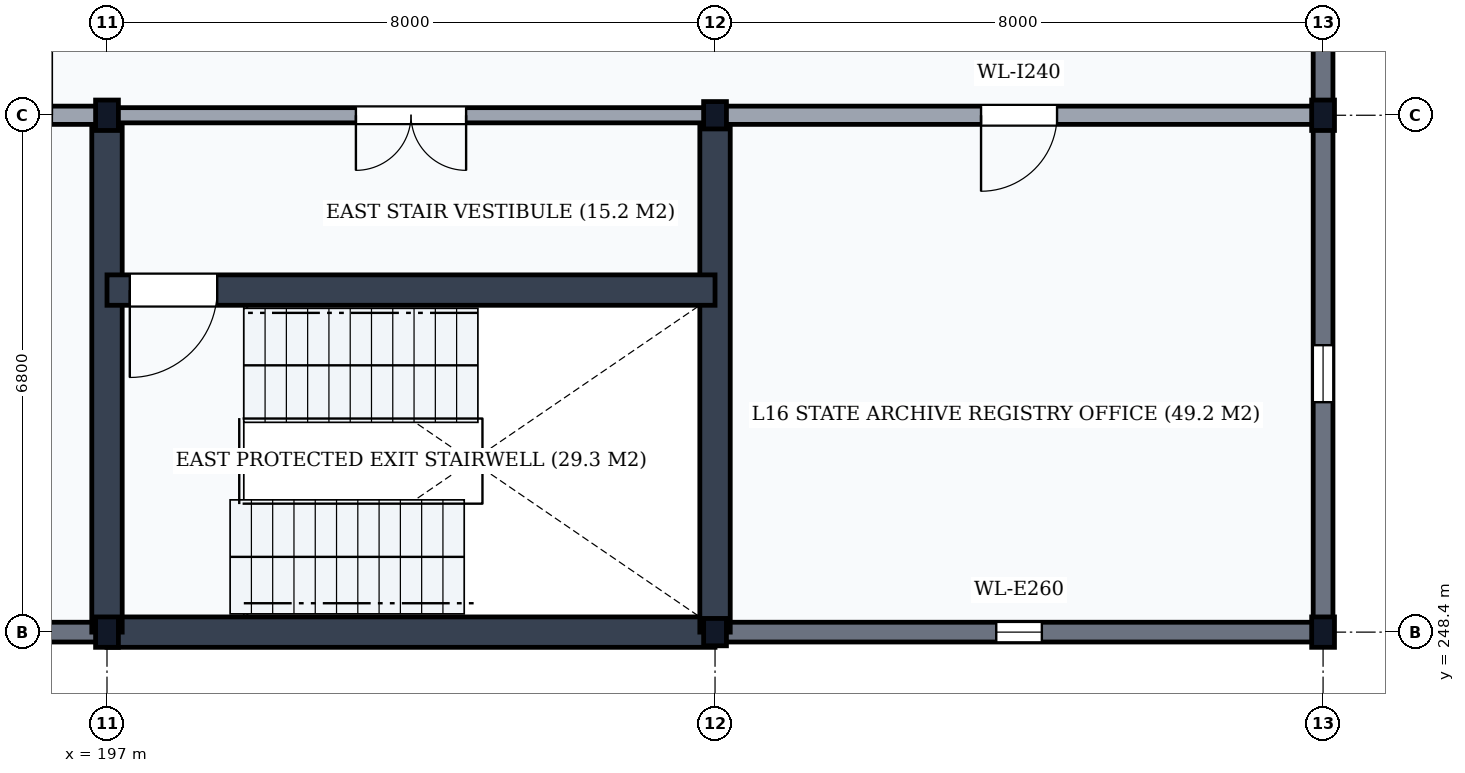
"""IFC4 building model, lengths in metres.
Left out: names, types, materials, properties, quantities, classifications, styles, units other than length and angle.
Written with IfcOpenShell. Run it as: python <this file> out.ifc"""

import sys

from ifc_helpers import new_model, si_unit, direction, frame, frame_2d, origin, origin_2d, place, context, subcontext, project, spatial, rectangle, i_section, extrude, element, fill, save


model = new_model("IFC4")
c1 = context("Model", 3, precision=1e-05, world=origin(), true_north=direction((0.0, 1.0)))
c2 = subcontext(c1, "Body", "Model", "MODEL_VIEW")
j1 = project(units=[si_unit("LENGTHUNIT", "METRE"), si_unit("PLANEANGLEUNIT", "RADIAN")], contexts=[c1])
p1 = place(None, origin())
s1 = spatial("IfcSite", under=j1, at=p1, CompositionType="ELEMENT")
p2 = place(p1, origin())
s2 = spatial("IfcBuilding", under=s1, at=p2, CompositionType="ELEMENT")
p3 = place(p2, frame((0.0, 0.0, 63.9)))
s3 = spatial("IfcBuildingStorey", under=s2, at=p3, CompositionType="ELEMENT", Elevation=63.9)
for number, where, z_axis, x_axis in (
    (1, (197.0, 248.4, 0.0), (0.0, 0.0, 1.0), (1.0, 0.0, 0.0)),
    (2, (197.0, 255.2, 0.0), (0.0, 0.0, 1.0), (1.0, 0.0, 0.0)),
):
    element("IfcColumn", number, at=place(p3, frame(where, z_axis=z_axis, x_axis=x_axis)), inside=s3, PredefinedType="COLUMN", context=c2, shape_type="SweptSolid", body=[
        extrude(i_section(OverallWidth=0.3, OverallDepth=0.4, WebThickness=0.013, FlangeThickness=0.024, FilletRadius=0.027, at=origin_2d()), origin(), (0.0, 0.0, 1.0), 3.9),
    ])
for number, where, z_axis, x_axis in (
    (3, (205.0, 248.4, 0.0), (0.0, 0.0, 1.0), (1.0, 0.0, 0.0)),
    (4, (205.0, 255.2, 0.0), (0.0, 0.0, 1.0), (1.0, 0.0, 0.0)),
):
    element("IfcColumn", number, at=place(p3, frame(where, z_axis=z_axis, x_axis=x_axis)), inside=s3, PredefinedType="COLUMN", context=c2, shape_type="SweptSolid", body=[
        extrude(i_section(OverallWidth=0.3, OverallDepth=0.36, WebThickness=0.012, FlangeThickness=0.022, FilletRadius=0.027, at=origin_2d()), origin(), (0.0, 0.0, 1.0), 3.9),
    ])
for number, where, z_axis, x_axis in (
    (5, (213.0, 248.4, 0.0), (0.0, 0.0, 1.0), (1.0, 0.0, 0.0)),
    (6, (213.0, 255.2, 0.0), (0.0, 0.0, 1.0), (1.0, 0.0, 0.0)),
):
    element("IfcColumn", number, at=place(p3, frame(where, z_axis=z_axis, x_axis=x_axis)), inside=s3, PredefinedType="COLUMN", context=c2, shape_type="SweptSolid", body=[
        extrude(i_section(OverallWidth=0.3, OverallDepth=0.4, WebThickness=0.013, FlangeThickness=0.024, FilletRadius=0.027, at=origin_2d()), origin(), (0.0, 0.0, 1.0), 3.9),
    ])
p4 = place(p3, frame((189.006, 248.4, 0.0), z_axis=(0.0, 0.0, 1.0), x_axis=(1.0, 0.0, 0.0)))
e7 = element("IfcWall", 7, at=p4, inside=s3, PredefinedType="SOLIDWALL", context=c2, shape_type="SweptSolid", body=[
    extrude(rectangle(XDim=7.988, YDim=0.26, at=frame_2d((3.994, 0.0))), origin(), (0.0, 0.0, 1.0), 3.388),
])
p5 = place(p3, frame((205.006, 248.4, 0.0), z_axis=(0.0, 0.0, 1.0), x_axis=(1.0, 0.0, 0.0)))
e8 = element("IfcWall", 8, at=p5, inside=s3, PredefinedType="SOLIDWALL", context=c2, shape_type="SweptSolid", body=[
    extrude(rectangle(XDim=7.988, YDim=0.26, at=frame_2d((3.994, 0.0))), origin(), (0.0, 0.0, 1.0), 3.388),
])
p6 = place(p5, frame((3.694, 0.0, 0.95)))
e9 = element("IfcOpeningElement", 9, at=p6, cuts=e8, PredefinedType="OPENING", context=c2, shape_type="SweptSolid", body=[
    extrude(rectangle(XDim=0.6, YDim=1.5, at=frame_2d((0.3, 0.75))), frame((0.0, 0.145, 0.0), z_axis=(0.0, -1.0, 0.0), x_axis=(1.0, 0.0, 0.0)), (0.0, 0.0, 1.0), 0.29),
])
p7 = place(p3, frame((213.0, 248.406, 0.0), z_axis=(0.0, 0.0, 1.0), x_axis=(0.0, 1.0, 0.0)))
e10 = element("IfcWall", 10, at=p7, inside=s3, PredefinedType="SOLIDWALL", context=c2, shape_type="SweptSolid", body=[
    extrude(rectangle(XDim=6.788, YDim=0.26, at=frame_2d((3.394, 0.0))), origin(), (0.0, 0.0, 1.0), 3.468),
])
p8 = place(p7, frame((3.019, 0.0, 0.95)))
e11 = element("IfcOpeningElement", 11, at=p8, cuts=e10, PredefinedType="OPENING", context=c2, shape_type="SweptSolid", body=[
    extrude(rectangle(XDim=0.75, YDim=2.0, at=frame_2d((0.375, 1.0))), frame((0.0, 0.145, 0.0), z_axis=(0.0, -1.0, 0.0), x_axis=(1.0, 0.0, 0.0)), (0.0, 0.0, 1.0), 0.29),
])
p9 = place(p3, frame((213.0, 255.206, 0.0), z_axis=(0.0, 0.0, 1.0), x_axis=(0.0, 1.0, 0.0)))
e12 = element("IfcWall", 12, at=p9, inside=s3, PredefinedType="SOLIDWALL", context=c2, shape_type="SweptSolid", body=[
    extrude(rectangle(XDim=7.588, YDim=0.26, at=frame_2d((3.794, 0.0))), origin(), (0.0, 0.0, 1.0), 3.428),
])
p10 = place(p3, frame((197.0, 248.4, 0.0), z_axis=(0.0, 0.0, 1.0), x_axis=(1.0, 0.0, 0.0)))
e13 = element("IfcWall", 13, at=p10, inside=s3, PredefinedType="SHEAR", context=c2, shape_type="SweptSolid", body=[
    extrude(rectangle(XDim=8.0, YDim=0.4, at=frame_2d((4.0, 0.0))), origin(), (0.0, 0.0, 1.0), 3.7),
])
for number, where, z_axis, x_axis in (
    (14, (197.0, 248.4, 0.0), (0.0, 0.0, 1.0), (0.0, 1.0, 0.0)),
    (15, (205.0, 248.4, 0.0), (0.0, 0.0, 1.0), (0.0, 1.0, 0.0)),
):
    element("IfcWall", number, at=place(p3, frame(where, z_axis=z_axis, x_axis=x_axis)), inside=s3, PredefinedType="SHEAR", context=c2, shape_type="SweptSolid", body=[
        extrude(rectangle(XDim=6.8, YDim=0.4, at=frame_2d((3.4, 0.0))), origin(), (0.0, 0.0, 1.0), 3.7),
    ])
p11 = place(p3, frame((197.0, 252.9, 0.0), z_axis=(0.0, 0.0, 1.0), x_axis=(1.0, 0.0, 0.0)))
e16 = element("IfcWall", 16, at=p11, inside=s3, PredefinedType="SHEAR", context=c2, shape_type="SweptSolid", body=[
    extrude(rectangle(XDim=8.0, YDim=0.4, at=frame_2d((4.0, 0.0))), origin(), (0.0, 0.0, 1.0), 3.7),
])
p12 = place(p11, frame((0.3, 0.0, 0.0)))
e17 = element("IfcOpeningElement", 17, at=p12, cuts=e16, PredefinedType="OPENING", context=c2, shape_type="SweptSolid", body=[
    extrude(rectangle(XDim=1.15, YDim=2.15, at=frame_2d((0.575, 1.075))), frame((0.0, 0.215, 0.0), z_axis=(0.0, -1.0, 0.0), x_axis=(1.0, 0.0, 0.0)), (0.0, 0.0, 1.0), 0.43),
])
p13 = place(p3, frame((197.0, 255.2, 0.0), z_axis=(0.0, 0.0, 1.0), x_axis=(1.0, 0.0, 0.0)))
e18 = element("IfcWall", 18, at=p13, inside=s3, PredefinedType="PARTITIONING", context=c2, shape_type="SweptSolid", body=[
    extrude(rectangle(XDim=8.0, YDim=0.2, at=frame_2d((4.0, 0.0))), origin(), (0.0, 0.0, 1.0), 3.148),
])
p14 = place(p13, frame((3.275, 0.0, 0.0)))
e19 = element("IfcOpeningElement", 19, at=p14, cuts=e18, PredefinedType="OPENING", context=c2, shape_type="SweptSolid", body=[
    extrude(rectangle(XDim=1.45, YDim=2.2, at=frame_2d((0.725, 1.1))), frame((0.0, 0.115, 0.0), z_axis=(0.0, -1.0, 0.0), x_axis=(1.0, 0.0, 0.0)), (0.0, 0.0, 1.0), 0.23),
])
p15 = place(p3, frame((189.0, 255.2, 0.0), z_axis=(0.0, 0.0, 1.0), x_axis=(1.0, 0.0, 0.0)))
e20 = element("IfcWall", 20, at=p15, inside=s3, PredefinedType="PARTITIONING", context=c2, shape_type="SweptSolid", body=[
    extrude(rectangle(XDim=8.0, YDim=0.24, at=frame_2d((4.0, 0.0))), origin(), (0.0, 0.0, 1.0), 3.148),
])
p16 = place(p15, frame((1.05, 0.0, 0.0)))
e21 = element("IfcOpeningElement", 21, at=p16, cuts=e20, PredefinedType="OPENING", context=c2, shape_type="SweptSolid", body=[
    extrude(rectangle(XDim=1.0, YDim=2.1, at=frame_2d((0.5, 1.05))), frame((0.0, 0.135, 0.0), z_axis=(0.0, -1.0, 0.0), x_axis=(1.0, 0.0, 0.0)), (0.0, 0.0, 1.0), 0.27),
])
p17 = place(p15, frame((3.6, 0.0, 0.0)))
e22 = element("IfcOpeningElement", 22, at=p17, cuts=e20, PredefinedType="OPENING", context=c2, shape_type="SweptSolid", body=[
    extrude(rectangle(XDim=1.5, YDim=2.25, at=frame_2d((0.75, 1.125))), frame((0.0, 0.135, 0.0), z_axis=(0.0, -1.0, 0.0), x_axis=(1.0, 0.0, 0.0)), (0.0, 0.0, 1.0), 0.27),
])
p18 = place(p15, frame((6.425, 0.0, 0.0)))
e23 = element("IfcOpeningElement", 23, at=p18, cuts=e20, PredefinedType="OPENING", context=c2, shape_type="SweptSolid", body=[
    extrude(rectangle(XDim=0.85, YDim=2.1, at=frame_2d((0.425, 1.05))), frame((0.0, 0.135, 0.0), z_axis=(0.0, -1.0, 0.0), x_axis=(1.0, 0.0, 0.0)), (0.0, 0.0, 1.0), 0.27),
])
p19 = place(p3, frame((205.0, 255.2, 0.0), z_axis=(0.0, 0.0, 1.0), x_axis=(1.0, 0.0, 0.0)))
e24 = element("IfcWall", 24, at=p19, inside=s3, PredefinedType="PARTITIONING", context=c2, shape_type="SweptSolid", body=[
    extrude(rectangle(XDim=8.0, YDim=0.24, at=frame_2d((4.0, 0.0))), origin(), (0.0, 0.0, 1.0), 3.148),
])
p20 = place(p19, frame((3.5, 0.0, 0.0)))
e25 = element("IfcOpeningElement", 25, at=p20, cuts=e24, PredefinedType="OPENING", context=c2, shape_type="SweptSolid", body=[
    extrude(rectangle(XDim=1.0, YDim=2.1, at=frame_2d((0.5, 1.05))), frame((0.0, 0.135, 0.0), z_axis=(0.0, -1.0, 0.0), x_axis=(1.0, 0.0, 0.0)), (0.0, 0.0, 1.0), 0.27),
])
p21 = place(p6, origin())
e26 = element("IfcWindow", 26, at=p21, inside=s3, PartitioningType="SINGLE_PANEL", PredefinedType="WINDOW", context=c2, shape_type="SweptSolid", body=[
    extrude(rectangle(XDim=0.6, YDim=1.5, at=frame_2d((0.3, 0.75))), frame((0.0, 0.03, 0.0), z_axis=(0.0, -1.0, 0.0), x_axis=(1.0, 0.0, 0.0)), (0.0, 0.0, 1.0), 0.06),
])
fill(e9, e26)
p22 = place(p8, origin())
e27 = element("IfcWindow", 27, at=p22, inside=s3, PartitioningType="SINGLE_PANEL", PredefinedType="WINDOW", context=c2, shape_type="SweptSolid", body=[
    extrude(rectangle(XDim=0.75, YDim=2.0, at=frame_2d((0.375, 1.0))), frame((0.0, 0.03, 0.0), z_axis=(0.0, -1.0, 0.0), x_axis=(1.0, 0.0, 0.0)), (0.0, 0.0, 1.0), 0.06),
])
fill(e11, e27)
p23 = place(p12, frame((1.15, 0.0, 0.0), z_axis=(0.0, 0.0, 1.0), x_axis=(-1.0, 0.0, 0.0)))
e28 = element("IfcDoor", 28, at=p23, inside=s3, OperationType="SINGLE_SWING_RIGHT", PredefinedType="DOOR", context=c2, shape_type="SweptSolid", body=[
    extrude(rectangle(XDim=1.15, YDim=2.15, at=frame_2d((0.575, 1.075))), frame((0.0, 0.025, 0.0), z_axis=(0.0, -1.0, 0.0), x_axis=(1.0, 0.0, 0.0)), (0.0, 0.0, 1.0), 0.05),
])
fill(e17, e28)
p24 = place(p14, frame((1.45, 0.0, 0.0), z_axis=(0.0, 0.0, 1.0), x_axis=(-1.0, 0.0, 0.0)))
e29 = element("IfcDoor", 29, at=p24, inside=s3, OperationType="DOUBLE_DOOR_SINGLE_SWING", PredefinedType="DOOR", context=c2, shape_type="SweptSolid", body=[
    extrude(rectangle(XDim=1.45, YDim=2.2, at=frame_2d((0.725, 1.1))), frame((0.0, 0.025, 0.0), z_axis=(0.0, -1.0, 0.0), x_axis=(1.0, 0.0, 0.0)), (0.0, 0.0, 1.0), 0.05),
])
fill(e19, e29)
p25 = place(p20, frame((1.0, 0.0, 0.0), z_axis=(0.0, 0.0, 1.0), x_axis=(-1.0, 0.0, 0.0)))
e30 = element("IfcDoor", 30, at=p25, inside=s3, OperationType="SINGLE_SWING_RIGHT", PredefinedType="DOOR", context=c2, shape_type="SweptSolid", body=[
    extrude(rectangle(XDim=1.0, YDim=2.1, at=frame_2d((0.5, 1.05))), frame((0.0, 0.025, 0.0), z_axis=(0.0, -1.0, 0.0), x_axis=(1.0, 0.0, 0.0)), (0.0, 0.0, 1.0), 0.05),
])
fill(e25, e30)
save(model, sys.argv[1])
